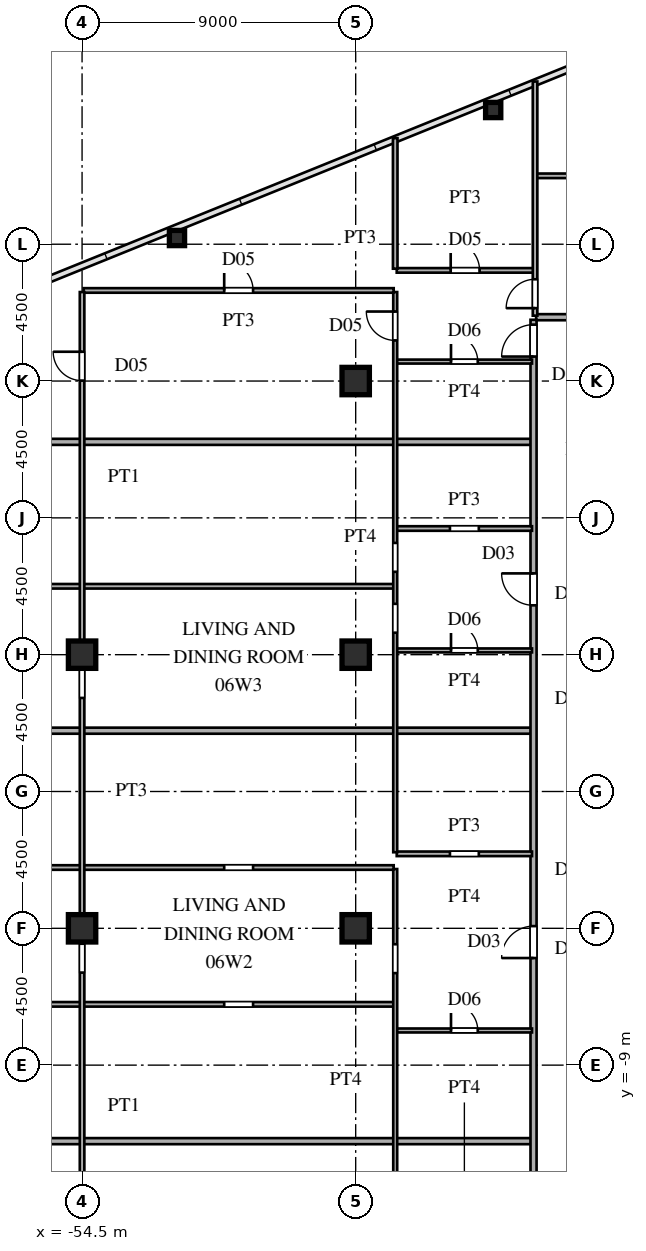
"""IFC4 building model, lengths in metres.
Left out: names, types, materials, properties, quantities, classifications, styles, units other than length and angle.
Written with IfcOpenShell. Run it as: python <this file> out.ifc"""

import sys

from ifc_helpers import new_model, si_unit, direction, frame, frame_2d, origin, origin_2d, place, context, subcontext, project, spatial, rectangle, hollow_rectangle, i_section, extrude, source, transform, mapped, element, fill, save


model = new_model("IFC4")
c1 = context("Model", 3, precision=1e-05, world=origin(), true_north=direction((0.0, 1.0)))
c2 = subcontext(c1, "Body", "Model", "MODEL_VIEW")
j1 = project(units=[si_unit("LENGTHUNIT", "METRE"), si_unit("PLANEANGLEUNIT", "RADIAN")], contexts=[c1])
p1 = place(None, origin())
s1 = spatial("IfcSite", under=j1, at=p1, CompositionType="ELEMENT")
p2 = place(p1, origin())
s2 = spatial("IfcBuilding", under=s1, at=p2, CompositionType="ELEMENT")
p3 = place(p2, frame((0.0, 0.0, 26.1)))
s3 = spatial("IfcBuildingStorey", under=s2, at=p3, CompositionType="ELEMENT", Elevation=26.1)
m1 = source(origin(), c2, "Body", "SweptSolid", [
    extrude(i_section(OverallWidth=0.9, OverallDepth=0.9, WebThickness=0.036, FlangeThickness=0.055, at=origin_2d()), origin(), (0.0, 0.0, 1.0), 3.6),
])
for number, where, z_axis, x_axis in (
    (1, (-45.5, -4.5, 0.0), (0.0, 0.0, 1.0), (1.0, 0.0, 0.0)),
    (2, (-45.5, 4.5, 0.0), (0.0, 0.0, 1.0), (1.0, 0.0, 0.0)),
    (3, (-45.5, 13.5, 0.0), (0.0, 0.0, 1.0), (1.0, 0.0, 0.0)),
    (4, (-54.5, -4.5, 0.0), (0.0, 0.0, 1.0), (1.0, 0.0, 0.0)),
    (5, (-54.5, 4.5, 0.0), (0.0, 0.0, 1.0), (1.0, 0.0, 0.0)),
):
    element("IfcColumn", number, at=place(p3, frame(where, z_axis=z_axis, x_axis=x_axis)), inside=s3, PredefinedType="COLUMN", context=c2, shape_type="MappedRepresentation", body=[
        mapped(m1, transform((0.0, 0.0, 0.0), scale=1.0)),
    ])
m2 = source(origin(), c2, "Body", "SweptSolid", [
    extrude(hollow_rectangle(XDim=0.5, YDim=0.5, WallThickness=0.02, at=origin_2d()), origin(), (0.0, 0.0, 1.0), 3.6),
])
for number, where, z_axis, x_axis in (
    (6, (-40.977, 22.414, 0.0), (0.0, 0.0, 1.0), (1.0, 0.0, 0.0)),
    (7, (-51.378, 18.204, 0.0), (0.0, 0.0, 1.0), (1.0, 0.0, 0.0)),
):
    element("IfcColumn", number, at=place(p3, frame(where, z_axis=z_axis, x_axis=x_axis)), inside=s3, PredefinedType="COLUMN", context=c2, shape_type="MappedRepresentation", body=[
        mapped(m2, transform((0.0, 0.0, 0.0), scale=1.0)),
    ])
p4 = place(p3, frame((-68.807, -11.5, 0.0), z_axis=(0.0, 0.0, 1.0), x_axis=(1.0, 0.0, 0.0)))
e8 = element("IfcWall", 8, at=p4, inside=s3, PredefinedType="PARTITIONING", context=c2, shape_type="SweptSolid", body=[
    extrude(rectangle(XDim=29.077, YDim=0.2, at=frame_2d((14.539, 0.0))), origin(), (0.0, 0.0, 1.0), 3.38),
])
p5 = place(p3, frame((-44.15, -7.86, 0.0), z_axis=(0.0, 0.0, 1.0), x_axis=(1.0, 0.0, 0.0)))
e9 = element("IfcWall", 9, at=p5, inside=s3, PredefinedType="PARTITIONING", context=c2, shape_type="SweptSolid", body=[
    extrude(rectangle(XDim=4.45, YDim=0.13, at=frame_2d((2.225, 0.0))), origin(), (0.0, 0.0, 1.0), 3.38),
])
p6 = place(p5, frame((1.785, 0.0, 0.0)))
e10 = element("IfcOpeningElement", 10, at=p6, cuts=e9, PredefinedType="OPENING", context=c2, shape_type="SweptSolid", body=[
    extrude(rectangle(XDim=0.88, YDim=2.1, at=frame_2d((0.44, 1.05))), frame((0.0, 0.075, 0.0), z_axis=(0.0, -1.0, 0.0), x_axis=(1.0, 0.0, 0.0)), (0.0, 0.0, 1.0), 0.15),
])
p7 = place(p3, frame((-72.535, -7.0, 0.0), z_axis=(0.0, 0.0, 1.0), x_axis=(1.0, 0.0, 0.0)))
e11 = element("IfcWall", 11, at=p7, inside=s3, PredefinedType="PARTITIONING", context=c2, shape_type="SweptSolid", body=[
    extrude(rectangle(XDim=28.285, YDim=0.15, at=frame_2d((14.143, 0.0))), origin(), (0.0, 0.0, 1.0), 3.38),
])
p8 = place(p7, frame((22.71, 0.0, 0.0)))
e12 = element("IfcOpeningElement", 12, at=p8, cuts=e11, PredefinedType="OPENING", context=c2, shape_type="SweptSolid", body=[
    extrude(rectangle(XDim=0.95, YDim=2.15, at=frame_2d((0.475, 1.075))), frame((0.0, 0.085, 0.0), z_axis=(0.0, -1.0, 0.0), x_axis=(1.0, 0.0, 0.0)), (0.0, 0.0, 1.0), 0.17),
])
p9 = place(p7, frame((14.71, 0.0, 0.0)))
e13 = element("IfcOpeningElement", 13, at=p9, cuts=e11, PredefinedType="OPENING", context=c2, shape_type="SweptSolid", body=[
    extrude(rectangle(XDim=0.95, YDim=2.15, at=frame_2d((0.475, 1.075))), frame((0.0, 0.085, 0.0), z_axis=(0.0, -1.0, 0.0), x_axis=(1.0, 0.0, 0.0)), (0.0, 0.0, 1.0), 0.17),
])
p10 = place(p3, frame((-72.535, -2.5, 0.0), z_axis=(0.0, 0.0, 1.0), x_axis=(1.0, 0.0, 0.0)))
e14 = element("IfcWall", 14, at=p10, inside=s3, PredefinedType="PARTITIONING", context=c2, shape_type="SweptSolid", body=[
    extrude(rectangle(XDim=28.285, YDim=0.15, at=frame_2d((14.143, 0.0))), origin(), (0.0, 0.0, 1.0), 3.38),
])
p11 = place(p10, frame((22.71, 0.0, 0.0)))
e15 = element("IfcOpeningElement", 15, at=p11, cuts=e14, PredefinedType="OPENING", context=c2, shape_type="SweptSolid", body=[
    extrude(rectangle(XDim=0.95, YDim=2.15, at=frame_2d((0.475, 1.075))), frame((0.0, 0.085, 0.0), z_axis=(0.0, -1.0, 0.0), x_axis=(1.0, 0.0, 0.0)), (0.0, 0.0, 1.0), 0.17),
])
p12 = place(p10, frame((14.71, 0.0, 0.0)))
e16 = element("IfcOpeningElement", 16, at=p12, cuts=e14, PredefinedType="OPENING", context=c2, shape_type="SweptSolid", body=[
    extrude(rectangle(XDim=0.95, YDim=2.15, at=frame_2d((0.475, 1.075))), frame((0.0, 0.085, 0.0), z_axis=(0.0, -1.0, 0.0), x_axis=(1.0, 0.0, 0.0)), (0.0, 0.0, 1.0), 0.17),
])
p13 = place(p3, frame((-44.15, -2.05, 0.0), z_axis=(0.0, 0.0, 1.0), x_axis=(1.0, 0.0, 0.0)))
e17 = element("IfcWall", 17, at=p13, inside=s3, PredefinedType="PARTITIONING", context=c2, shape_type="SweptSolid", body=[
    extrude(rectangle(XDim=4.45, YDim=0.15, at=frame_2d((2.225, 0.0))), origin(), (0.0, 0.0, 1.0), 3.38),
])
p14 = place(p13, frame((1.75, 0.0, 0.0)))
e18 = element("IfcOpeningElement", 18, at=p14, cuts=e17, PredefinedType="OPENING", context=c2, shape_type="SweptSolid", body=[
    extrude(rectangle(XDim=0.95, YDim=2.15, at=frame_2d((0.475, 1.075))), frame((0.0, 0.085, 0.0), z_axis=(0.0, -1.0, 0.0), x_axis=(1.0, 0.0, 0.0)), (0.0, 0.0, 1.0), 0.17),
])
p15 = place(p3, frame((-72.505, 2.0, 0.0), z_axis=(0.0, 0.0, 1.0), x_axis=(1.0, 0.0, 0.0)))
e19 = element("IfcWall", 19, at=p15, inside=s3, PredefinedType="PARTITIONING", context=c2, shape_type="SweptSolid", body=[
    extrude(rectangle(XDim=32.775, YDim=0.2, at=frame_2d((16.387, 0.0))), origin(), (0.0, 0.0, 1.0), 3.38),
])
p16 = place(p3, frame((-44.15, 4.64, 0.0), z_axis=(0.0, 0.0, 1.0), x_axis=(1.0, 0.0, 0.0)))
e20 = element("IfcWall", 20, at=p16, inside=s3, PredefinedType="PARTITIONING", context=c2, shape_type="SweptSolid", body=[
    extrude(rectangle(XDim=4.45, YDim=0.13, at=frame_2d((2.225, 0.0))), origin(), (0.0, 0.0, 1.0), 2.68),
])
p17 = place(p16, frame((1.785, 0.0, 0.0)))
e21 = element("IfcOpeningElement", 21, at=p17, cuts=e20, PredefinedType="OPENING", context=c2, shape_type="SweptSolid", body=[
    extrude(rectangle(XDim=0.88, YDim=2.1, at=frame_2d((0.44, 1.05))), frame((0.0, 0.075, 0.0), z_axis=(0.0, -1.0, 0.0), x_axis=(1.0, 0.0, 0.0)), (0.0, 0.0, 1.0), 0.15),
])
p18 = place(p3, frame((-72.535, 6.75, 0.0), z_axis=(0.0, 0.0, 1.0), x_axis=(1.0, 0.0, 0.0)))
e22 = element("IfcWall", 22, at=p18, inside=s3, PredefinedType="PARTITIONING", context=c2, shape_type="SweptSolid", body=[
    extrude(rectangle(XDim=28.285, YDim=0.15, at=frame_2d((14.143, 0.0))), origin(), (0.0, 0.0, 1.0), 3.38),
])
p19 = place(p18, frame((5.71, 0.0, 0.0)))
e23 = element("IfcOpeningElement", 23, at=p19, cuts=e22, PredefinedType="OPENING", context=c2, shape_type="SweptSolid", body=[
    extrude(rectangle(XDim=0.95, YDim=2.15, at=frame_2d((0.475, 1.075))), frame((0.0, 0.085, 0.0), z_axis=(0.0, -1.0, 0.0), x_axis=(1.0, 0.0, 0.0)), (0.0, 0.0, 1.0), 0.17),
])
p20 = place(p18, frame((14.71, 0.0, 0.0)))
e24 = element("IfcOpeningElement", 24, at=p20, cuts=e22, PredefinedType="OPENING", context=c2, shape_type="SweptSolid", body=[
    extrude(rectangle(XDim=0.95, YDim=2.15, at=frame_2d((0.475, 1.075))), frame((0.0, 0.085, 0.0), z_axis=(0.0, -1.0, 0.0), x_axis=(1.0, 0.0, 0.0)), (0.0, 0.0, 1.0), 0.17),
])
p21 = place(p3, frame((-44.15, 8.65, 0.0), z_axis=(0.0, 0.0, 1.0), x_axis=(1.0, 0.0, 0.0)))
e25 = element("IfcWall", 25, at=p21, inside=s3, PredefinedType="PARTITIONING", context=c2, shape_type="SweptSolid", body=[
    extrude(rectangle(XDim=4.45, YDim=0.15, at=frame_2d((2.225, 0.0))), origin(), (0.0, 0.0, 1.0), 3.38),
])
p22 = place(p21, frame((1.75, 0.0, 0.0)))
e26 = element("IfcOpeningElement", 26, at=p22, cuts=e25, PredefinedType="OPENING", context=c2, shape_type="SweptSolid", body=[
    extrude(rectangle(XDim=0.95, YDim=2.15, at=frame_2d((0.475, 1.075))), frame((0.0, 0.085, 0.0), z_axis=(0.0, -1.0, 0.0), x_axis=(1.0, 0.0, 0.0)), (0.0, 0.0, 1.0), 0.17),
])
p23 = place(p3, frame((-68.807, 11.5, 0.0), z_axis=(0.0, 0.0, 1.0), x_axis=(1.0, 0.0, 0.0)))
e27 = element("IfcWall", 27, at=p23, inside=s3, PredefinedType="PARTITIONING", context=c2, shape_type="SweptSolid", body=[
    extrude(rectangle(XDim=29.077, YDim=0.2, at=frame_2d((14.539, 0.0))), origin(), (0.0, 0.0, 1.0), 3.38),
])
p24 = place(p3, frame((-44.15, 14.14, 0.0), z_axis=(0.0, 0.0, 1.0), x_axis=(1.0, 0.0, 0.0)))
e28 = element("IfcWall", 28, at=p24, inside=s3, PredefinedType="PARTITIONING", context=c2, shape_type="SweptSolid", body=[
    extrude(rectangle(XDim=4.45, YDim=0.13, at=frame_2d((2.225, 0.0))), origin(), (0.0, 0.0, 1.0), 3.38),
])
p25 = place(p24, frame((1.785, 0.0, 0.0)))
e29 = element("IfcOpeningElement", 29, at=p25, cuts=e28, PredefinedType="OPENING", context=c2, shape_type="SweptSolid", body=[
    extrude(rectangle(XDim=0.88, YDim=2.1, at=frame_2d((0.44, 1.05))), frame((0.0, 0.075, 0.0), z_axis=(0.0, -1.0, 0.0), x_axis=(1.0, 0.0, 0.0)), (0.0, 0.0, 1.0), 0.15),
])
p26 = place(p3, frame((-39.565, 15.6, 0.0), z_axis=(0.0, 0.0, 1.0), x_axis=(1.0, 0.0, 0.0)))
e30 = element("IfcWall", 30, at=p26, inside=s3, PredefinedType="PARTITIONING", context=c2, shape_type="SweptSolid", body=[
    extrude(rectangle(XDim=2.98, YDim=0.2, at=frame_2d((1.49, 0.0))), origin(), (0.0, 0.0, 1.0), 3.38),
])
p27 = place(p3, frame((-54.45, 16.48, 0.0), z_axis=(0.0, 0.0, 1.0), x_axis=(1.0, 0.0, 0.0)))
e31 = element("IfcWall", 31, at=p27, inside=s3, PredefinedType="PARTITIONING", context=c2, shape_type="SweptSolid", body=[
    extrude(rectangle(XDim=10.2, YDim=0.15, at=frame_2d((5.1, 0.0))), origin(), (0.0, 0.0, 1.0), 3.38),
])
p28 = place(p27, frame((4.625, 0.0, 0.0)))
e32 = element("IfcOpeningElement", 32, at=p28, cuts=e31, PredefinedType="OPENING", context=c2, shape_type="SweptSolid", body=[
    extrude(rectangle(XDim=0.95, YDim=2.15, at=frame_2d((0.475, 1.075))), frame((0.0, 0.085, 0.0), z_axis=(0.0, -1.0, 0.0), x_axis=(1.0, 0.0, 0.0)), (0.0, 0.0, 1.0), 0.17),
])
p29 = place(p3, frame((-44.15, 17.14, 0.0), z_axis=(0.0, 0.0, 1.0), x_axis=(1.0, 0.0, 0.0)))
e33 = element("IfcWall", 33, at=p29, inside=s3, PredefinedType="PARTITIONING", context=c2, shape_type="SweptSolid", body=[
    extrude(rectangle(XDim=4.5, YDim=0.15, at=frame_2d((2.25, 0.0))), origin(), (0.0, 0.0, 1.0), 3.38),
])
p30 = place(p29, frame((1.775, 0.0, 0.0)))
e34 = element("IfcOpeningElement", 34, at=p30, cuts=e33, PredefinedType="OPENING", context=c2, shape_type="SweptSolid", body=[
    extrude(rectangle(XDim=0.95, YDim=2.15, at=frame_2d((0.475, 1.075))), frame((0.0, 0.085, 0.0), z_axis=(0.0, -1.0, 0.0), x_axis=(1.0, 0.0, 0.0)), (0.0, 0.0, 1.0), 0.17),
])
p31 = place(p3, frame((-39.55, 20.25, 0.0), z_axis=(0.0, 0.0, 1.0), x_axis=(1.0, 0.0, 0.0)))
e35 = element("IfcWall", 35, at=p31, inside=s3, PredefinedType="PARTITIONING", context=c2, shape_type="SweptSolid", body=[
    extrude(rectangle(XDim=12.085, YDim=0.15, at=frame_2d((6.042, 0.0))), origin(), (0.0, 0.0, 1.0), 3.38),
])
p32 = place(p31, frame((5.525, 0.0, 0.0)))
e36 = element("IfcOpeningElement", 36, at=p32, cuts=e35, PredefinedType="OPENING", context=c2, shape_type="SweptSolid", body=[
    extrude(rectangle(XDim=0.95, YDim=2.15, at=frame_2d((0.475, 1.075))), frame((0.0, 0.085, 0.0), z_axis=(0.0, -1.0, 0.0), x_axis=(1.0, 0.0, 0.0)), (0.0, 0.0, 1.0), 0.17),
])
p33 = place(p3, frame((-54.5, -16.427, 0.0), z_axis=(0.0, 0.0, 1.0), x_axis=(0.0, 1.0, 0.0)))
e37 = element("IfcWall", 37, at=p33, inside=s3, PredefinedType="PARTITIONING", context=c2, shape_type="SweptSolid", body=[
    extrude(rectangle(XDim=32.854, YDim=0.15, at=frame_2d((16.427, 0.0))), origin(), (0.0, 0.0, 1.0), 2.68),
])
p34 = place(p33, frame((1.963, 0.0, 0.0)))
e38 = element("IfcOpeningElement", 38, at=p34, cuts=e37, PredefinedType="OPENING", context=c2, shape_type="SweptSolid", body=[
    extrude(rectangle(XDim=0.95, YDim=2.15, at=frame_2d((0.475, 1.075))), frame((0.0, 0.085, 0.0), z_axis=(0.0, -1.0, 0.0), x_axis=(1.0, 0.0, 0.0)), (0.0, 0.0, 1.0), 0.17),
])
p35 = place(p33, frame((10.47, 0.0, 0.0)))
e39 = element("IfcOpeningElement", 39, at=p35, cuts=e37, PredefinedType="OPENING", context=c2, shape_type="SweptSolid", body=[
    extrude(rectangle(XDim=0.95, YDim=2.15, at=frame_2d((0.475, 1.075))), frame((0.0, 0.085, 0.0), z_axis=(0.0, -1.0, 0.0), x_axis=(1.0, 0.0, 0.0)), (0.0, 0.0, 1.0), 0.17),
])
p36 = place(p33, frame((19.504, 0.0, 0.0)))
e40 = element("IfcOpeningElement", 40, at=p36, cuts=e37, PredefinedType="OPENING", context=c2, shape_type="SweptSolid", body=[
    extrude(rectangle(XDim=0.95, YDim=2.15, at=frame_2d((0.475, 1.075))), frame((0.0, 0.085, 0.0), z_axis=(0.0, -1.0, 0.0), x_axis=(1.0, 0.0, 0.0)), (0.0, 0.0, 1.0), 0.17),
])
p37 = place(p33, frame((29.941, 0.0, 0.0)))
e41 = element("IfcOpeningElement", 41, at=p37, cuts=e37, PredefinedType="OPENING", context=c2, shape_type="SweptSolid", body=[
    extrude(rectangle(XDim=0.95, YDim=2.15, at=frame_2d((0.475, 1.075))), frame((0.0, 0.085, 0.0), z_axis=(0.0, -1.0, 0.0), x_axis=(1.0, 0.0, 0.0)), (0.0, 0.0, 1.0), 0.17),
])
p38 = place(p3, frame((-44.2, -16.427, 0.0), z_axis=(0.0, 0.0, 1.0), x_axis=(0.0, 1.0, 0.0)))
e42 = element("IfcWall", 42, at=p38, inside=s3, PredefinedType="PARTITIONING", context=c2, shape_type="SweptSolid", body=[
    extrude(rectangle(XDim=13.877, YDim=0.13, at=frame_2d((6.938, 0.0))), origin(), (0.0, 0.0, 1.0), 3.38),
])
p39 = place(p38, frame((0.641, 0.0, 0.0)))
e43 = element("IfcOpeningElement", 43, at=p39, cuts=e42, PredefinedType="OPENING", context=c2, shape_type="SweptSolid", body=[
    extrude(rectangle(XDim=0.95, YDim=2.15, at=frame_2d((0.475, 1.075))), frame((0.0, 0.075, 0.0), z_axis=(0.0, -1.0, 0.0), x_axis=(1.0, 0.0, 0.0)), (0.0, 0.0, 1.0), 0.15),
])
p40 = place(p38, frame((10.454, 0.0, 0.0)))
e44 = element("IfcOpeningElement", 44, at=p40, cuts=e42, PredefinedType="OPENING", context=c2, shape_type="SweptSolid", body=[
    extrude(rectangle(XDim=0.95, YDim=2.15, at=frame_2d((0.475, 1.075))), frame((0.0, 0.075, 0.0), z_axis=(0.0, -1.0, 0.0), x_axis=(1.0, 0.0, 0.0)), (0.0, 0.0, 1.0), 0.15),
])
p41 = place(p3, frame((-44.2, -1.998, 0.0), z_axis=(0.0, 0.0, 1.0), x_axis=(0.0, 1.0, 0.0)))
e45 = element("IfcWall", 45, at=p41, inside=s3, PredefinedType="PARTITIONING", context=c2, shape_type="SweptSolid", body=[
    extrude(rectangle(XDim=18.425, YDim=0.13, at=frame_2d((9.212, 0.0))), origin(), (0.0, 0.0, 1.0), 3.38),
])
p42 = place(p41, frame((7.22, 0.0, 0.0)))
e46 = element("IfcOpeningElement", 46, at=p42, cuts=e45, PredefinedType="OPENING", context=c2, shape_type="SweptSolid", body=[
    extrude(rectangle(XDim=0.95, YDim=2.15, at=frame_2d((0.475, 1.075))), frame((0.0, 0.075, 0.0), z_axis=(0.0, -1.0, 0.0), x_axis=(1.0, 0.0, 0.0)), (0.0, 0.0, 1.0), 0.15),
])
p43 = place(p41, frame((9.224, 0.0, 0.0)))
e47 = element("IfcOpeningElement", 47, at=p43, cuts=e45, PredefinedType="OPENING", context=c2, shape_type="SweptSolid", body=[
    extrude(rectangle(XDim=0.95, YDim=2.15, at=frame_2d((0.475, 1.075))), frame((0.0, 0.075, 0.0), z_axis=(0.0, -1.0, 0.0), x_axis=(1.0, 0.0, 0.0)), (0.0, 0.0, 1.0), 0.15),
])
p44 = place(p41, frame((16.834, 0.0, 0.0)))
e48 = element("IfcOpeningElement", 48, at=p44, cuts=e45, PredefinedType="OPENING", context=c2, shape_type="SweptSolid", body=[
    extrude(rectangle(XDim=0.95, YDim=2.15, at=frame_2d((0.475, 1.075))), frame((0.0, 0.075, 0.0), z_axis=(0.0, -1.0, 0.0), x_axis=(1.0, 0.0, 0.0)), (0.0, 0.0, 1.0), 0.15),
])
p45 = place(p3, frame((-44.2, 17.195, 0.0), z_axis=(0.0, 0.0, 1.0), x_axis=(0.0, 1.0, 0.0)))
e49 = element("IfcWall", 49, at=p45, inside=s3, PredefinedType="PARTITIONING", context=c2, shape_type="SweptSolid", body=[
    extrude(rectangle(XDim=4.295, YDim=0.15, at=frame_2d((2.147, 0.0))), origin(), (0.0, 0.0, 1.0), 3.38),
])
p46 = place(p3, frame((-39.65, -15.515, 0.0), z_axis=(0.0, 0.0, 1.0), x_axis=(0.0, 1.0, 0.0)))
e50 = element("IfcWall", 50, at=p46, inside=s3, PredefinedType="PARTITIONING", context=c2, shape_type="SweptSolid", body=[
    extrude(rectangle(XDim=31.03, YDim=0.2, at=frame_2d((15.515, 0.0))), origin(), (0.0, 0.0, 1.0), 3.38),
])
p47 = place(p46, frame((0.16, 0.0, 0.0)))
e51 = element("IfcOpeningElement", 51, at=p47, cuts=e50, PredefinedType="OPENING", context=c2, shape_type="SweptSolid", body=[
    extrude(rectangle(XDim=1.05, YDim=2.25, at=frame_2d((0.525, 1.125))), frame((0.0, 0.11, 0.0), z_axis=(0.0, -1.0, 0.0), x_axis=(1.0, 0.0, 0.0)), (0.0, 0.0, 1.0), 0.22),
])
p48 = place(p46, frame((10.038, 0.0, 0.0)))
e52 = element("IfcOpeningElement", 52, at=p48, cuts=e50, PredefinedType="OPENING", context=c2, shape_type="SweptSolid", body=[
    extrude(rectangle(XDim=1.05, YDim=2.25, at=frame_2d((0.525, 1.125))), frame((0.0, 0.11, 0.0), z_axis=(0.0, -1.0, 0.0), x_axis=(1.0, 0.0, 0.0)), (0.0, 0.0, 1.0), 0.22),
])
p49 = place(p46, frame((21.638, 0.0, 0.0)))
e53 = element("IfcOpeningElement", 53, at=p49, cuts=e50, PredefinedType="OPENING", context=c2, shape_type="SweptSolid", body=[
    extrude(rectangle(XDim=1.05, YDim=2.25, at=frame_2d((0.525, 1.125))), frame((0.0, 0.11, 0.0), z_axis=(0.0, -1.0, 0.0), x_axis=(1.0, 0.0, 0.0)), (0.0, 0.0, 1.0), 0.22),
])
p50 = place(p46, frame((29.82, 0.0, 0.0)))
e54 = element("IfcOpeningElement", 54, at=p50, cuts=e50, PredefinedType="OPENING", context=c2, shape_type="SweptSolid", body=[
    extrude(rectangle(XDim=1.05, YDim=2.25, at=frame_2d((0.525, 1.125))), frame((0.0, 0.11, 0.0), z_axis=(0.0, -1.0, 0.0), x_axis=(1.0, 0.0, 0.0)), (0.0, 0.0, 1.0), 0.22),
])
p51 = place(p3, frame((-39.6, 15.65, 0.0), z_axis=(0.0, 0.0, 1.0), x_axis=(0.0, 1.0, 0.0)))
e55 = element("IfcWall", 55, at=p51, inside=s3, PredefinedType="PARTITIONING", context=c2, shape_type="SweptSolid", body=[
    extrude(rectangle(XDim=7.702, YDim=0.15, at=frame_2d((3.851, 0.0))), origin(), (0.0, 0.0, 1.0), 3.38),
])
p52 = place(p51, frame((0.248, 0.0, 0.0)))
e56 = element("IfcOpeningElement", 56, at=p52, cuts=e55, PredefinedType="OPENING", context=c2, shape_type="SweptSolid", body=[
    extrude(rectangle(XDim=0.95, YDim=2.15, at=frame_2d((0.475, 1.075))), frame((0.0, 0.085, 0.0), z_axis=(0.0, -1.0, 0.0), x_axis=(1.0, 0.0, 0.0)), (0.0, 0.0, 1.0), 0.17),
])
m3 = source(origin(), c2, "Body", "SweptSolid", [
    extrude(rectangle(XDim=0.88, YDim=2.1, at=frame_2d((0.44, 1.05))), frame((0.0, 0.025, 0.0), z_axis=(0.0, -1.0, 0.0), x_axis=(1.0, 0.0, 0.0)), (0.0, 0.0, 1.0), 0.05),
])
p53 = place(p6, origin())
e57 = element("IfcDoor", 57, at=p53, inside=s3, OperationType="SINGLE_SWING_LEFT", PredefinedType="DOOR", context=c2, shape_type="MappedRepresentation", body=[
    mapped(m3, transform((0.0, 0.0, 0.0), scale=1.0)),
])
fill(e10, e57)
p54 = place(p17, origin())
e58 = element("IfcDoor", 58, at=p54, inside=s3, OperationType="SINGLE_SWING_LEFT", PredefinedType="DOOR", context=c2, shape_type="MappedRepresentation", body=[
    mapped(m3, transform((0.0, 0.0, 0.0), scale=1.0)),
])
fill(e21, e58)
p55 = place(p25, origin())
e59 = element("IfcDoor", 59, at=p55, inside=s3, OperationType="SINGLE_SWING_LEFT", PredefinedType="DOOR", context=c2, shape_type="MappedRepresentation", body=[
    mapped(m3, transform((0.0, 0.0, 0.0), scale=1.0)),
])
fill(e29, e59)
m4 = source(origin(), c2, "Body", "SweptSolid", [
    extrude(rectangle(XDim=0.95, YDim=2.15, at=frame_2d((0.475, 1.075))), frame((0.0, 0.025, 0.0), z_axis=(0.0, -1.0, 0.0), x_axis=(1.0, 0.0, 0.0)), (0.0, 0.0, 1.0), 0.05),
])
p56 = place(p28, origin())
e60 = element("IfcDoor", 60, at=p56, inside=s3, OperationType="SINGLE_SWING_LEFT", PredefinedType="DOOR", context=c2, shape_type="MappedRepresentation", body=[
    mapped(m4, transform((0.0, 0.0, 0.0), scale=1.0)),
])
fill(e32, e60)
p57 = place(p30, origin())
e61 = element("IfcDoor", 61, at=p57, inside=s3, OperationType="SINGLE_SWING_LEFT", PredefinedType="DOOR", context=c2, shape_type="MappedRepresentation", body=[
    mapped(m4, transform((0.0, 0.0, 0.0), scale=1.0)),
])
fill(e34, e61)
p58 = place(p37, origin())
e62 = element("IfcDoor", 62, at=p58, inside=s3, OperationType="SINGLE_SWING_RIGHT", PredefinedType="DOOR", context=c2, shape_type="MappedRepresentation", body=[
    mapped(m4, transform((0.0, 0.0, 0.0), scale=1.0)),
])
fill(e41, e62)
p59 = place(p44, origin())
e63 = element("IfcDoor", 63, at=p59, inside=s3, OperationType="SINGLE_SWING_RIGHT", PredefinedType="DOOR", context=c2, shape_type="MappedRepresentation", body=[
    mapped(m4, transform((0.0, 0.0, 0.0), scale=1.0)),
])
fill(e48, e63)
m5 = source(origin(), c2, "Body", "SweptSolid", [
    extrude(rectangle(XDim=1.05, YDim=2.25, at=frame_2d((0.525, 1.125))), frame((0.0, 0.025, 0.0), z_axis=(0.0, -1.0, 0.0), x_axis=(1.0, 0.0, 0.0)), (0.0, 0.0, 1.0), 0.05),
])
p60 = place(p48, origin())
e64 = element("IfcDoor", 64, at=p60, inside=s3, OperationType="SINGLE_SWING_LEFT", PredefinedType="DOOR", context=c2, shape_type="MappedRepresentation", body=[
    mapped(m5, transform((0.0, 0.0, 0.0), scale=1.0)),
])
fill(e52, e64)
p61 = place(p49, origin())
e65 = element("IfcDoor", 65, at=p61, inside=s3, OperationType="SINGLE_SWING_RIGHT", PredefinedType="DOOR", context=c2, shape_type="MappedRepresentation", body=[
    mapped(m5, transform((0.0, 0.0, 0.0), scale=1.0)),
])
fill(e53, e65)
p62 = place(p50, origin())
e66 = element("IfcDoor", 66, at=p62, inside=s3, OperationType="SINGLE_SWING_LEFT", PredefinedType="DOOR", context=c2, shape_type="MappedRepresentation", body=[
    mapped(m5, transform((0.0, 0.0, 0.0), scale=1.0)),
])
fill(e54, e66)
p63 = place(p52, origin())
e67 = element("IfcDoor", 67, at=p63, inside=s3, OperationType="SINGLE_SWING_LEFT", PredefinedType="DOOR", context=c2, shape_type="MappedRepresentation", body=[
    mapped(m4, transform((0.0, 0.0, 0.0), scale=1.0)),
])
fill(e56, e67)
save(model, sys.argv[1])
